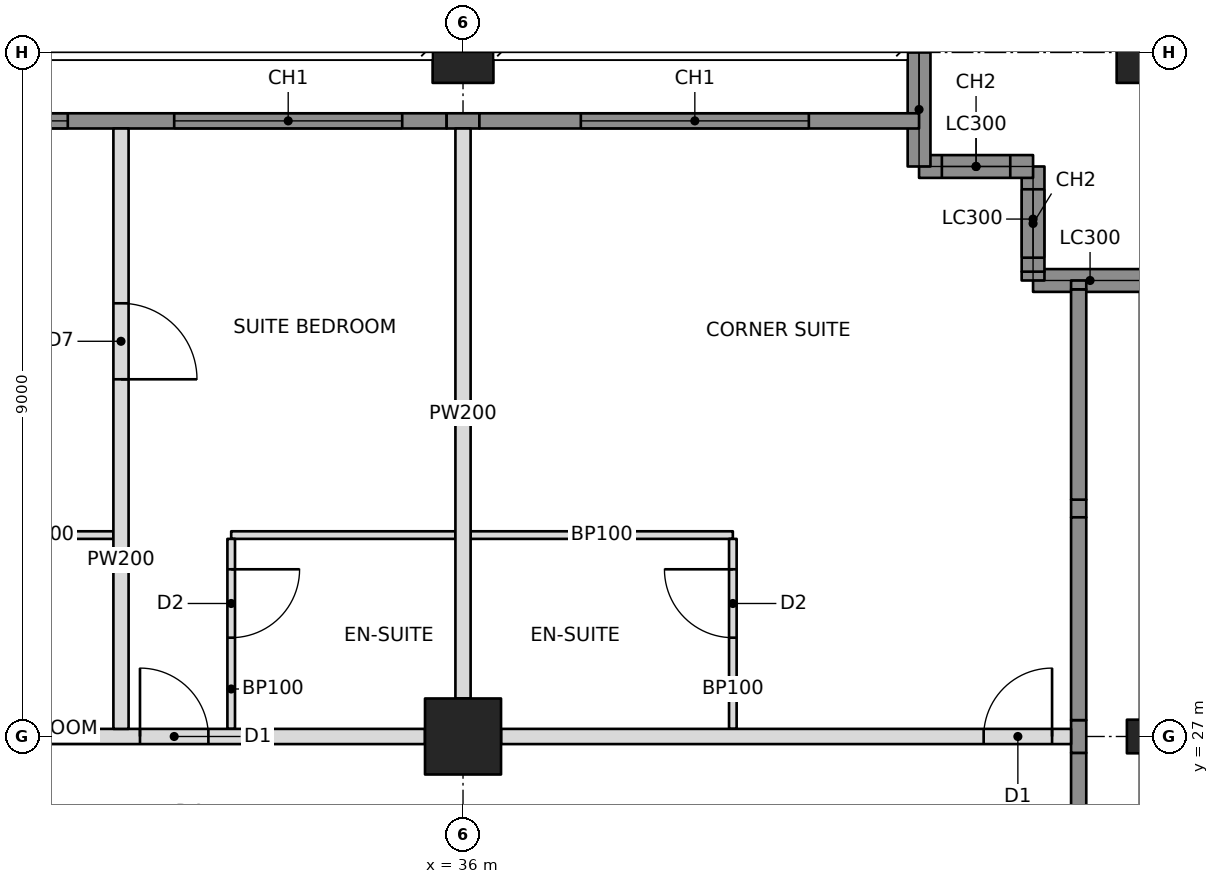
"""IFC4 building model, lengths in metres.
Left out: names, types, materials, properties, quantities, classifications, styles, units other than length and angle.
Written with IfcOpenShell. Run it as: python <this file> out.ifc"""

import sys

from ifc_helpers import new_model, si_unit, direction, frame, frame_2d, origin, origin_2d, place, context, subcontext, project, spatial, rectangle, hollow_rectangle, i_section, extrude, element, fill, save


model = new_model("IFC4")
c1 = context("Model", 3, precision=1e-05, world=origin(), true_north=direction((0.0, 1.0)))
c2 = subcontext(c1, "Body", "Model", "MODEL_VIEW")
j1 = project(units=[si_unit("LENGTHUNIT", "METRE"), si_unit("PLANEANGLEUNIT", "RADIAN")], contexts=[c1])
p1 = place(None, origin())
s1 = spatial("IfcSite", under=j1, at=p1, CompositionType="ELEMENT")
p2 = place(p1, origin())
s2 = spatial("IfcBuilding", under=s1, at=p2, CompositionType="ELEMENT")
p3 = place(p2, frame((0.0, 0.0, 152.0)))
s3 = spatial("IfcBuildingStorey", under=s2, at=p3, CompositionType="ELEMENT", Elevation=152.0)
p4 = place(p3, frame((36.0, 27.0, 0.0), z_axis=(0.0, 0.0, 1.0), x_axis=(1.0, 0.0, 0.0)))
e1 = element("IfcColumn", 1, at=p4, inside=s3, PredefinedType="COLUMN", context=c2, shape_type="SweptSolid", body=[
    extrude(hollow_rectangle(XDim=1.0, YDim=1.0, WallThickness=0.1, at=origin_2d()), origin(), (0.0, 0.0, 1.0), 3.4),
])
p5 = place(p3, frame((36.0, 36.0, 0.0), z_axis=(0.0, 0.0, 1.0), x_axis=(1.0, 0.0, 0.0)))
e2 = element("IfcColumn", 2, at=p5, inside=s3, PredefinedType="COLUMN", context=c2, shape_type="SweptSolid", body=[
    extrude(hollow_rectangle(XDim=0.8, YDim=0.8, WallThickness=0.06, at=origin_2d()), origin(), (0.0, 0.0, 1.0), 3.4),
])
p6 = place(p3, frame((45.0, 27.0, 0.0), z_axis=(0.0, 0.0, 1.0), x_axis=(0.0, 1.0, 0.0)))
e3 = element("IfcColumn", 3, at=p6, inside=s3, PredefinedType="COLUMN", context=c2, shape_type="SweptSolid", body=[
    extrude(i_section(OverallWidth=0.442, OverallDepth=0.531, WebThickness=0.066, FlangeThickness=0.106, at=origin_2d()), origin(), (0.0, 0.0, 1.0), 3.4),
])
p7 = place(p3, frame((45.0, 36.0, 0.0), z_axis=(0.0, 0.0, 1.0), x_axis=(1.0, 0.0, 0.0)))
e4 = element("IfcColumn", 4, at=p7, inside=s3, PredefinedType="COLUMN", context=c2, shape_type="SweptSolid", body=[
    extrude(hollow_rectangle(XDim=0.8, YDim=0.8, WallThickness=0.06, at=origin_2d()), origin(), (0.0, 0.0, 1.0), 3.4),
])
p8 = place(p3, frame((45.0, 33.0, 0.0), z_axis=(0.0, 0.0, 1.0), x_axis=(-1.0, 0.0, 0.0)))
e5 = element("IfcWall", 5, at=p8, inside=s3, PredefinedType="SOLIDWALL", context=c2, shape_type="SweptSolid", body=[
    extrude(rectangle(XDim=1.5, YDim=0.3, at=frame_2d((0.75, 0.0))), origin(), (0.0, 0.0, 1.0), 2.202),
])
p9 = place(p3, frame((43.5, 33.0, 0.0), z_axis=(0.0, 0.0, 1.0), x_axis=(0.0, 1.0, 0.0)))
e6 = element("IfcWall", 6, at=p9, inside=s3, PredefinedType="SOLIDWALL", context=c2, shape_type="SweptSolid", body=[
    extrude(rectangle(XDim=0.116, YDim=0.3, at=frame_2d((0.058, 0.0))), origin(), (0.0, 0.0, 1.0), 2.542),
])
p10 = place(p3, frame((43.5, 34.5, 0.0), z_axis=(0.0, 0.0, 1.0), x_axis=(-1.0, 0.0, 0.0)))
e7 = element("IfcWall", 7, at=p10, inside=s3, PredefinedType="SOLIDWALL", context=c2, shape_type="SweptSolid", body=[
    extrude(rectangle(XDim=1.5, YDim=0.3, at=frame_2d((0.75, 0.0))), origin(), (0.0, 0.0, 1.0), 3.15),
])
p11 = place(p10, frame((0.3, 0.0, 0.6)))
e8 = element("IfcOpeningElement", 8, at=p11, cuts=e7, PredefinedType="OPENING", context=c2, shape_type="SweptSolid", body=[
    extrude(rectangle(XDim=0.9, YDim=2.2, at=frame_2d((0.45, 1.1))), frame((0.0, 0.16, 0.0), z_axis=(0.0, -1.0, 0.0), x_axis=(1.0, 0.0, 0.0)), (0.0, 0.0, 1.0), 0.32),
])
p12 = place(p3, frame((42.0, 34.5, 0.0), z_axis=(0.0, 0.0, 1.0), x_axis=(0.0, 1.0, 0.0)))
e9 = element("IfcWall", 9, at=p12, inside=s3, PredefinedType="SOLIDWALL", context=c2, shape_type="SweptSolid", body=[
    extrude(rectangle(XDim=1.5, YDim=0.3, at=frame_2d((0.75, 0.0))), origin(), (0.0, 0.0, 1.0), 2.202),
])
p13 = place(p3, frame((27.5, 27.0, 0.0), z_axis=(0.0, 0.0, 1.0), x_axis=(1.0, 0.0, 0.0)))
e10 = element("IfcWall", 10, at=p13, inside=s3, PredefinedType="PARTITIONING", context=c2, shape_type="SweptSolid", body=[
    extrude(rectangle(XDim=8.0, YDim=0.2, at=frame_2d((4.0, 0.0))), origin(), (0.0, 0.0, 1.0), 2.21),
])
p14 = place(p13, frame((4.25, 0.0, 0.0)))
e11 = element("IfcOpeningElement", 11, at=p14, cuts=e10, PredefinedType="OPENING", context=c2, shape_type="SweptSolid", body=[
    extrude(rectangle(XDim=0.9, YDim=2.1, at=frame_2d((0.45, 1.05))), frame((0.0, 0.11, 0.0), z_axis=(0.0, -1.0, 0.0), x_axis=(1.0, 0.0, 0.0)), (0.0, 0.0, 1.0), 0.22),
])
p15 = place(p3, frame((36.5, 27.0, 0.0), z_axis=(0.0, 0.0, 1.0), x_axis=(1.0, 0.0, 0.0)))
e12 = element("IfcWall", 12, at=p15, inside=s3, PredefinedType="PARTITIONING", context=c2, shape_type="SweptSolid", body=[
    extrude(rectangle(XDim=7.5, YDim=0.2, at=frame_2d((3.75, 0.0))), origin(), (0.0, 0.0, 1.0), 2.21),
])
p16 = place(p15, frame((6.35, 0.0, 0.0)))
e13 = element("IfcOpeningElement", 13, at=p16, cuts=e12, PredefinedType="OPENING", context=c2, shape_type="SweptSolid", body=[
    extrude(rectangle(XDim=0.9, YDim=2.1, at=frame_2d((0.45, 1.05))), frame((0.0, 0.11, 0.0), z_axis=(0.0, -1.0, 0.0), x_axis=(1.0, 0.0, 0.0)), (0.0, 0.0, 1.0), 0.22),
])
p17 = place(p3, frame((31.5, 27.1, 0.0), z_axis=(0.0, 0.0, 1.0), x_axis=(0.0, 1.0, 0.0)))
e14 = element("IfcWall", 14, at=p17, inside=s3, PredefinedType="PARTITIONING", context=c2, shape_type="SweptSolid", body=[
    extrude(rectangle(XDim=7.9, YDim=0.2, at=frame_2d((3.95, 0.0))), origin(), (0.0, 0.0, 1.0), 2.21),
])
p18 = place(p17, frame((4.6, 0.0, 0.0)))
e15 = element("IfcOpeningElement", 15, at=p18, cuts=e14, PredefinedType="OPENING", context=c2, shape_type="SweptSolid", body=[
    extrude(rectangle(XDim=1.0, YDim=2.1, at=frame_2d((0.5, 1.05))), frame((0.0, 0.11, 0.0), z_axis=(0.0, -1.0, 0.0), x_axis=(1.0, 0.0, 0.0)), (0.0, 0.0, 1.0), 0.22),
])
p19 = place(p3, frame((36.0, 27.5, 0.0), z_axis=(0.0, 0.0, 1.0), x_axis=(0.0, 1.0, 0.0)))
e16 = element("IfcWall", 16, at=p19, inside=s3, PredefinedType="PARTITIONING", context=c2, shape_type="SweptSolid", body=[
    extrude(rectangle(XDim=7.5, YDim=0.2, at=frame_2d((3.75, 0.0))), origin(), (0.0, 0.0, 1.0), 2.21),
])
p20 = place(p3, frame((29.55, 29.65, 0.0), z_axis=(0.0, 0.0, 1.0), x_axis=(1.0, 0.0, 0.0)))
e17 = element("IfcWall", 17, at=p20, inside=s3, PredefinedType="PARTITIONING", context=c2, shape_type="SweptSolid", body=[
    extrude(rectangle(XDim=1.85, YDim=0.1, at=frame_2d((0.925, 0.0))), origin(), (0.0, 0.0, 1.0), 3.15),
])
p21 = place(p3, frame((32.95, 29.65, 0.0), z_axis=(0.0, 0.0, 1.0), x_axis=(1.0, 0.0, 0.0)))
e18 = element("IfcWall", 18, at=p21, inside=s3, PredefinedType="PARTITIONING", context=c2, shape_type="SweptSolid", body=[
    extrude(rectangle(XDim=2.95, YDim=0.1, at=frame_2d((1.475, 0.0))), origin(), (0.0, 0.0, 1.0), 2.21),
])
p22 = place(p3, frame((32.95, 27.1, 0.0), z_axis=(0.0, 0.0, 1.0), x_axis=(0.0, 1.0, 0.0)))
e19 = element("IfcWall", 19, at=p22, inside=s3, PredefinedType="PARTITIONING", context=c2, shape_type="SweptSolid", body=[
    extrude(rectangle(XDim=2.5, YDim=0.1, at=frame_2d((1.25, 0.0))), origin(), (0.0, 0.0, 1.0), 2.21),
])
p23 = place(p22, frame((1.2, 0.0, 0.0)))
e20 = element("IfcOpeningElement", 20, at=p23, cuts=e19, PredefinedType="OPENING", context=c2, shape_type="SweptSolid", body=[
    extrude(rectangle(XDim=0.9, YDim=2.1, at=frame_2d((0.45, 1.05))), frame((0.0, 0.06, 0.0), z_axis=(0.0, -1.0, 0.0), x_axis=(1.0, 0.0, 0.0)), (0.0, 0.0, 1.0), 0.12),
])
p24 = place(p3, frame((36.1, 29.65, 0.0), z_axis=(0.0, 0.0, 1.0), x_axis=(1.0, 0.0, 0.0)))
e21 = element("IfcWall", 21, at=p24, inside=s3, PredefinedType="PARTITIONING", context=c2, shape_type="SweptSolid", body=[
    extrude(rectangle(XDim=3.45, YDim=0.1, at=frame_2d((1.725, 0.0))), origin(), (0.0, 0.0, 1.0), 2.21),
])
p25 = place(p3, frame((39.55, 27.1, 0.0), z_axis=(0.0, 0.0, 1.0), x_axis=(0.0, 1.0, 0.0)))
e22 = element("IfcWall", 22, at=p25, inside=s3, PredefinedType="PARTITIONING", context=c2, shape_type="SweptSolid", body=[
    extrude(rectangle(XDim=2.5, YDim=0.1, at=frame_2d((1.25, 0.0))), origin(), (0.0, 0.0, 1.0), 2.21),
])
p26 = place(p25, frame((1.2, 0.0, 0.0)))
e23 = element("IfcOpeningElement", 23, at=p26, cuts=e22, PredefinedType="OPENING", context=c2, shape_type="SweptSolid", body=[
    extrude(rectangle(XDim=0.9, YDim=2.1, at=frame_2d((0.45, 1.05))), frame((0.0, 0.06, 0.0), z_axis=(0.0, -1.0, 0.0), x_axis=(1.0, 0.0, 0.0)), (0.0, 0.0, 1.0), 0.12),
])
p27 = place(p3, frame((43.5, 33.116, 0.0), z_axis=(0.0, 0.0, 1.0), x_axis=(0.0, 1.0, 0.0)))
e24 = element("IfcWall", 24, at=p27, inside=s3, PredefinedType="SOLIDWALL", context=c2, shape_type="SweptSolid", body=[
    extrude(rectangle(XDim=1.384, YDim=0.3, at=frame_2d((0.692, 0.0))), origin(), (0.0, 0.0, 1.0), 3.15),
])
p28 = place(p27, frame((0.184, 0.0, 0.6)))
e25 = element("IfcOpeningElement", 25, at=p28, cuts=e24, PredefinedType="OPENING", context=c2, shape_type="SweptSolid", body=[
    extrude(rectangle(XDim=0.9, YDim=2.2, at=frame_2d((0.45, 1.1))), frame((0.0, 0.16, 0.0), z_axis=(0.0, -1.0, 0.0), x_axis=(1.0, 0.0, 0.0)), (0.0, 0.0, 1.0), 0.32),
])
p29 = place(p3, frame((27.214, 35.1, 0.0), z_axis=(0.0, 0.0, 1.0), x_axis=(1.0, 0.0, 0.0)))
e26 = element("IfcWall", 26, at=p29, inside=s3, PredefinedType="SOLIDWALL", context=c2, shape_type="SweptSolid", body=[
    extrude(rectangle(XDim=8.571, YDim=0.2, at=frame_2d((4.285, 0.0))), origin(), (0.0, 0.0, 1.0), 3.15),
])
p30 = place(p29, frame((0.586, 0.0, 0.6)))
e27 = element("IfcOpeningElement", 27, at=p30, cuts=e26, PredefinedType="OPENING", context=c2, shape_type="SweptSolid", body=[
    extrude(rectangle(XDim=3.0, YDim=2.2, at=frame_2d((1.5, 1.1))), frame((0.0, 0.11, 0.0), z_axis=(0.0, -1.0, 0.0), x_axis=(1.0, 0.0, 0.0)), (0.0, 0.0, 1.0), 0.22),
])
p31 = place(p29, frame((4.986, 0.0, 0.6)))
e28 = element("IfcOpeningElement", 28, at=p31, cuts=e26, PredefinedType="OPENING", context=c2, shape_type="SweptSolid", body=[
    extrude(rectangle(XDim=3.0, YDim=2.2, at=frame_2d((1.5, 1.1))), frame((0.0, 0.11, 0.0), z_axis=(0.0, -1.0, 0.0), x_axis=(1.0, 0.0, 0.0)), (0.0, 0.0, 1.0), 0.22),
])
p32 = place(p3, frame((35.785, 35.1, 0.0), z_axis=(0.0, 0.0, 1.0), x_axis=(1.0, 0.0, 0.0)))
e29 = element("IfcWall", 29, at=p32, inside=s3, PredefinedType="SOLIDWALL", context=c2, shape_type="SweptSolid", body=[
    extrude(rectangle(XDim=0.431, YDim=0.2, at=frame_2d((0.215, 0.0))), origin(), (0.0, 0.0, 1.0), 2.21),
])
p33 = place(p3, frame((36.215, 35.1, 0.0), z_axis=(0.0, 0.0, 1.0), x_axis=(1.0, 0.0, 0.0)))
e30 = element("IfcWall", 30, at=p33, inside=s3, PredefinedType="SOLIDWALL", context=c2, shape_type="SweptSolid", body=[
    extrude(rectangle(XDim=5.785, YDim=0.2, at=frame_2d((2.892, 0.0))), origin(), (0.0, 0.0, 1.0), 3.15),
])
p34 = place(p33, frame((1.335, 0.0, 0.6)))
e31 = element("IfcOpeningElement", 31, at=p34, cuts=e30, PredefinedType="OPENING", context=c2, shape_type="SweptSolid", body=[
    extrude(rectangle(XDim=3.0, YDim=2.2, at=frame_2d((1.5, 1.1))), frame((0.0, 0.11, 0.0), z_axis=(0.0, -1.0, 0.0), x_axis=(1.0, 0.0, 0.0)), (0.0, 0.0, 1.0), 0.22),
])
p35 = place(p3, frame((44.1, 18.214, 0.0), z_axis=(0.0, 0.0, 1.0), x_axis=(0.0, 1.0, 0.0)))
e32 = element("IfcWall", 32, at=p35, inside=s3, PredefinedType="SOLIDWALL", context=c2, shape_type="SweptSolid", body=[
    extrude(rectangle(XDim=8.571, YDim=0.2, at=frame_2d((4.285, 0.0))), origin(), (0.0, 0.0, 1.0), 3.15),
])
p36 = place(p35, frame((0.136, 0.0, 0.6)))
e33 = element("IfcOpeningElement", 33, at=p36, cuts=e32, PredefinedType="OPENING", context=c2, shape_type="SweptSolid", body=[
    extrude(rectangle(XDim=3.0, YDim=2.2, at=frame_2d((1.5, 1.1))), frame((0.0, 0.11, 0.0), z_axis=(0.0, -1.0, 0.0), x_axis=(1.0, 0.0, 0.0)), (0.0, 0.0, 1.0), 0.22),
])
p37 = place(p35, frame((3.636, 0.0, 0.6)))
e34 = element("IfcOpeningElement", 34, at=p37, cuts=e32, PredefinedType="OPENING", context=c2, shape_type="SweptSolid", body=[
    extrude(rectangle(XDim=3.0, YDim=2.2, at=frame_2d((1.5, 1.1))), frame((0.0, 0.11, 0.0), z_axis=(0.0, -1.0, 0.0), x_axis=(1.0, 0.0, 0.0)), (0.0, 0.0, 1.0), 0.22),
])
p38 = place(p3, frame((44.1, 26.785, 0.0), z_axis=(0.0, 0.0, 1.0), x_axis=(0.0, 1.0, 0.0)))
e35 = element("IfcWall", 35, at=p38, inside=s3, PredefinedType="SOLIDWALL", context=c2, shape_type="SweptSolid", body=[
    extrude(rectangle(XDim=0.431, YDim=0.2, at=frame_2d((0.215, 0.0))), origin(), (0.0, 0.0, 1.0), 2.21),
])
p39 = place(p3, frame((44.1, 27.215, 0.0), z_axis=(0.0, 0.0, 1.0), x_axis=(0.0, 1.0, 0.0)))
e36 = element("IfcWall", 36, at=p39, inside=s3, PredefinedType="SOLIDWALL", context=c2, shape_type="SweptSolid", body=[
    extrude(rectangle(XDim=2.668, YDim=0.2, at=frame_2d((1.334, 0.0))), origin(), (0.0, 0.0, 1.0), 3.15),
])
p40 = place(p3, frame((44.1, 29.884, 0.0), z_axis=(0.0, 0.0, 1.0), x_axis=(0.0, 1.0, 0.0)))
e37 = element("IfcWall", 37, at=p40, inside=s3, PredefinedType="SOLIDWALL", context=c2, shape_type="SweptSolid", body=[
    extrude(rectangle(XDim=0.232, YDim=0.2, at=frame_2d((0.116, 0.0))), origin(), (0.0, 0.0, 1.0), 2.542),
])
p41 = place(p3, frame((44.1, 30.116, 0.0), z_axis=(0.0, 0.0, 1.0), x_axis=(0.0, 1.0, 0.0)))
e38 = element("IfcWall", 38, at=p41, inside=s3, PredefinedType="SOLIDWALL", context=c2, shape_type="SweptSolid", body=[
    extrude(rectangle(XDim=2.768, YDim=0.2, at=frame_2d((1.384, 0.0))), origin(), (0.0, 0.0, 1.0), 3.15),
])
p42 = place(p3, frame((44.1, 32.884, 0.0), z_axis=(0.0, 0.0, 1.0), x_axis=(0.0, 1.0, 0.0)))
e39 = element("IfcWall", 39, at=p42, inside=s3, PredefinedType="SOLIDWALL", context=c2, shape_type="SweptSolid", body=[
    extrude(rectangle(XDim=0.116, YDim=0.2, at=frame_2d((0.058, 0.0))), origin(), (0.0, 0.0, 1.0), 2.542),
])
p43 = place(p28, origin())
e40 = element("IfcWindow", 40, at=p43, inside=s3, PartitioningType="SINGLE_PANEL", PredefinedType="WINDOW", context=c2, shape_type="SweptSolid", body=[
    extrude(rectangle(XDim=0.9, YDim=2.2, at=frame_2d((0.45, 1.1))), frame((0.0, 0.03, 0.0), z_axis=(0.0, -1.0, 0.0), x_axis=(1.0, 0.0, 0.0)), (0.0, 0.0, 1.0), 0.06),
])
fill(e25, e40)
p44 = place(p11, origin())
e41 = element("IfcWindow", 41, at=p44, inside=s3, PartitioningType="SINGLE_PANEL", PredefinedType="WINDOW", context=c2, shape_type="SweptSolid", body=[
    extrude(rectangle(XDim=0.9, YDim=2.2, at=frame_2d((0.45, 1.1))), frame((0.0, 0.03, 0.0), z_axis=(0.0, -1.0, 0.0), x_axis=(1.0, 0.0, 0.0)), (0.0, 0.0, 1.0), 0.06),
])
fill(e8, e41)
p45 = place(p30, origin())
e42 = element("IfcWindow", 42, at=p45, inside=s3, PartitioningType="TRIPLE_PANEL_VERTICAL", PredefinedType="WINDOW", context=c2, shape_type="SweptSolid", body=[
    extrude(rectangle(XDim=3.0, YDim=2.2, at=frame_2d((1.5, 1.1))), frame((0.0, 0.03, 0.0), z_axis=(0.0, -1.0, 0.0), x_axis=(1.0, 0.0, 0.0)), (0.0, 0.0, 1.0), 0.06),
])
fill(e27, e42)
p46 = place(p31, origin())
e43 = element("IfcWindow", 43, at=p46, inside=s3, PartitioningType="TRIPLE_PANEL_VERTICAL", PredefinedType="WINDOW", context=c2, shape_type="SweptSolid", body=[
    extrude(rectangle(XDim=3.0, YDim=2.2, at=frame_2d((1.5, 1.1))), frame((0.0, 0.03, 0.0), z_axis=(0.0, -1.0, 0.0), x_axis=(1.0, 0.0, 0.0)), (0.0, 0.0, 1.0), 0.06),
])
fill(e28, e43)
p47 = place(p34, origin())
e44 = element("IfcWindow", 44, at=p47, inside=s3, PartitioningType="TRIPLE_PANEL_VERTICAL", PredefinedType="WINDOW", context=c2, shape_type="SweptSolid", body=[
    extrude(rectangle(XDim=3.0, YDim=2.2, at=frame_2d((1.5, 1.1))), frame((0.0, 0.03, 0.0), z_axis=(0.0, -1.0, 0.0), x_axis=(1.0, 0.0, 0.0)), (0.0, 0.0, 1.0), 0.06),
])
fill(e31, e44)
p48 = place(p18, frame((1.0, 0.0, 0.0), z_axis=(0.0, 0.0, 1.0), x_axis=(-1.0, 0.0, 0.0)))
e45 = element("IfcDoor", 45, at=p48, inside=s3, OperationType="SINGLE_SWING_RIGHT", PredefinedType="DOOR", context=c2, shape_type="SweptSolid", body=[
    extrude(rectangle(XDim=1.0, YDim=2.1, at=frame_2d((0.5, 1.05))), frame((0.0, 0.025, 0.0), z_axis=(0.0, -1.0, 0.0), x_axis=(1.0, 0.0, 0.0)), (0.0, 0.0, 1.0), 0.05),
])
fill(e15, e45)
p49 = place(p23, frame((0.9, 0.0, 0.0), z_axis=(0.0, 0.0, 1.0), x_axis=(-1.0, 0.0, 0.0)))
e46 = element("IfcDoor", 46, at=p49, inside=s3, OperationType="SINGLE_SWING_LEFT", PredefinedType="DOOR", context=c2, shape_type="SweptSolid", body=[
    extrude(rectangle(XDim=0.9, YDim=2.1, at=frame_2d((0.45, 1.05))), frame((0.0, 0.025, 0.0), z_axis=(0.0, -1.0, 0.0), x_axis=(1.0, 0.0, 0.0)), (0.0, 0.0, 1.0), 0.05),
])
fill(e20, e46)
p50 = place(p14, origin())
e47 = element("IfcDoor", 47, at=p50, inside=s3, OperationType="SINGLE_SWING_LEFT", PredefinedType="DOOR", context=c2, shape_type="SweptSolid", body=[
    extrude(rectangle(XDim=0.9, YDim=2.1, at=frame_2d((0.45, 1.05))), frame((0.0, 0.025, 0.0), z_axis=(0.0, -1.0, 0.0), x_axis=(1.0, 0.0, 0.0)), (0.0, 0.0, 1.0), 0.05),
])
fill(e11, e47)
p51 = place(p26, origin())
e48 = element("IfcDoor", 48, at=p51, inside=s3, OperationType="SINGLE_SWING_RIGHT", PredefinedType="DOOR", context=c2, shape_type="SweptSolid", body=[
    extrude(rectangle(XDim=0.9, YDim=2.1, at=frame_2d((0.45, 1.05))), frame((0.0, 0.025, 0.0), z_axis=(0.0, -1.0, 0.0), x_axis=(1.0, 0.0, 0.0)), (0.0, 0.0, 1.0), 0.05),
])
fill(e23, e48)
p52 = place(p16, origin())
e49 = element("IfcDoor", 49, at=p52, inside=s3, OperationType="SINGLE_SWING_RIGHT", PredefinedType="DOOR", context=c2, shape_type="SweptSolid", body=[
    extrude(rectangle(XDim=0.9, YDim=2.1, at=frame_2d((0.45, 1.05))), frame((0.0, 0.025, 0.0), z_axis=(0.0, -1.0, 0.0), x_axis=(1.0, 0.0, 0.0)), (0.0, 0.0, 1.0), 0.05),
])
fill(e13, e49)
save(model, sys.argv[1])
